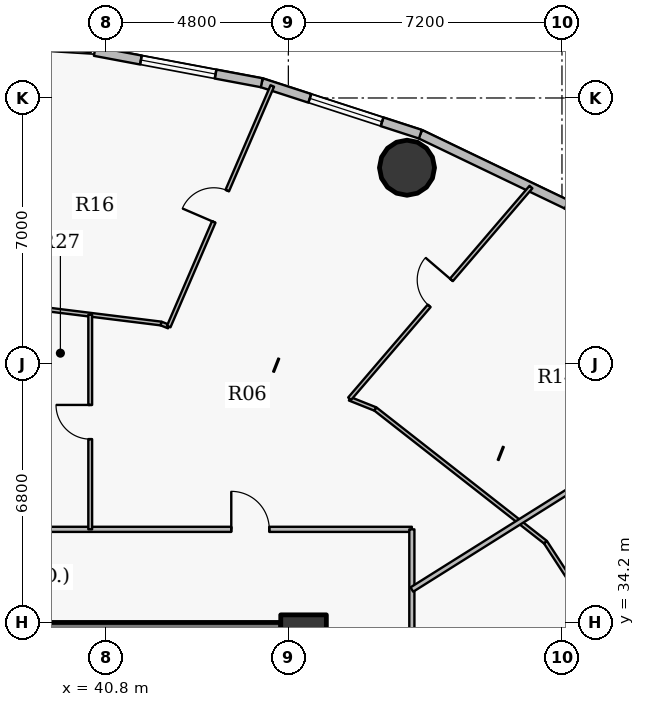
"""IFC4 building model, lengths in metres.
Left out: names, types, materials, properties, quantities, classifications, styles, units other than length and angle.
Written with IfcOpenShell. Run it as: python <this file> out.ifc"""

import sys

from ifc_helpers import new_model, si_unit, direction, frame, frame_2d, origin, origin_2d, place, context, subcontext, project, spatial, rectangle, hollow_circle, extrude, source, transform, mapped, element, fill, save


model = new_model("IFC4")
c1 = context("Model", 3, precision=1e-05, world=origin(), true_north=direction((0.0, 1.0)))
c2 = subcontext(c1, "Body", "Model", "MODEL_VIEW")
j1 = project(units=[si_unit("LENGTHUNIT", "METRE"), si_unit("PLANEANGLEUNIT", "RADIAN")], contexts=[c1])
p1 = place(None, origin())
s1 = spatial("IfcSite", under=j1, at=p1, CompositionType="ELEMENT")
p2 = place(p1, origin())
s2 = spatial("IfcBuilding", under=s1, at=p2, CompositionType="ELEMENT")
p3 = place(p2, frame((0.0, 0.0, 115.95)))
s3 = spatial("IfcBuildingStorey", under=s2, at=p3, CompositionType="ELEMENT", Elevation=115.95)
p4 = place(p3, frame((46.0, 33.8, 0.0), z_axis=(0.0, 0.0, 1.0), x_axis=(1.0, 0.0, 0.0)))
e1 = element("IfcColumn", 1, at=p4, inside=s3, PredefinedType="COLUMN", context=c2, shape_type="SweptSolid", body=[
    extrude(rectangle(XDim=1.2, YDim=1.2, at=origin_2d()), origin(), (0.0, 0.0, 1.0), 3.75),
])
p5 = place(p3, frame((26.6, 33.8, 0.0), z_axis=(0.0, 0.0, 1.0), x_axis=(1.0, 0.0, 0.0)))
e2 = element("IfcWall", 2, at=p5, inside=s3, PredefinedType="SHEAR", context=c2, shape_type="SweptSolid", body=[
    extrude(rectangle(XDim=18.8, YDim=0.8, at=frame_2d((9.4, 0.0))), origin(), (0.0, 0.0, 1.0), 2.95),
])
p6 = place(p3, frame((48.722, 46.165, 0.0), z_axis=(0.0, 0.0, 1.0), x_axis=(1.0, 0.0, 0.0)))
e3 = element("IfcColumn", 3, at=p6, inside=s3, PredefinedType="COLUMN", context=c2, shape_type="SweptSolid", body=[
    extrude(hollow_circle(Radius=0.725, WallThickness=0.042, at=origin_2d()), origin(), (0.0, 0.0, 1.0), 3.75),
])
p7 = place(p3, frame((52.925, 45.199, 0.0), z_axis=(0.0, 0.0, 1.0), x_axis=(0.831221811447, -0.555940914284, 0.0)))
e4 = element("IfcWall", 4, at=p7, inside=s3, PredefinedType="SOLIDWALL", context=c2, shape_type="SweptSolid", body=[
    extrude(rectangle(XDim=4.13, YDim=0.24, at=frame_2d((2.065, 0.0))), origin(), (0.0, 0.0, 1.0), 3.5),
])
p8 = place(p7, frame((1.065, 0.0, 0.9)))
e5 = element("IfcOpeningElement", 5, at=p8, cuts=e4, PredefinedType="OPENING", context=c2, shape_type="SweptSolid", body=[
    extrude(rectangle(XDim=2.0, YDim=1.75, at=origin_2d()), frame((1.0, 0.13, 0.875), z_axis=(0.0, -1.0, 0.0), x_axis=(1.0, 0.0, 0.0)), (0.0, 0.0, 1.0), 0.26),
])
p9 = place(p3, frame((49.074, 47.047, 0.0), z_axis=(0.0, 0.0, 1.0), x_axis=(0.901589935876, -0.432591709962, 0.0)))
e6 = element("IfcWall", 6, at=p9, inside=s3, PredefinedType="SOLIDWALL", context=c2, shape_type="SweptSolid", body=[
    extrude(rectangle(XDim=4.272, YDim=0.24, at=frame_2d((2.136, 0.0))), origin(), (0.0, 0.0, 1.0), 3.5),
])
p10 = place(p3, frame((44.9, 48.401, 0.0), z_axis=(0.0, 0.0, 1.0), x_axis=(0.951211346073, -0.308540070495, 0.0)))
e7 = element("IfcWall", 7, at=p10, inside=s3, PredefinedType="SOLIDWALL", context=c2, shape_type="SweptSolid", body=[
    extrude(rectangle(XDim=4.388, YDim=0.24, at=frame_2d((2.194, 0.0))), origin(), (0.0, 0.0, 1.0), 3.5),
])
p11 = place(p10, frame((1.329, 0.0, 0.9)))
e8 = element("IfcOpeningElement", 8, at=p11, cuts=e7, PredefinedType="OPENING", context=c2, shape_type="SweptSolid", body=[
    extrude(rectangle(XDim=2.0, YDim=1.75, at=origin_2d()), frame((1.0, 0.13, 0.875), z_axis=(0.0, -1.0, 0.0), x_axis=(1.0, 0.0, 0.0)), (0.0, 0.0, 1.0), 0.26),
])
p12 = place(p3, frame((40.506, 49.227, 0.0), z_axis=(0.0, 0.0, 1.0), x_axis=(0.982789252177, -0.184730305596, 0.0)))
e9 = element("IfcWall", 9, at=p12, inside=s3, PredefinedType="SOLIDWALL", context=c2, shape_type="SweptSolid", body=[
    extrude(rectangle(XDim=4.471, YDim=0.24, at=frame_2d((2.235, 0.0))), origin(), (0.0, 0.0, 1.0), 3.5),
])
p13 = place(p12, frame((1.236, 0.0, 0.9)))
e10 = element("IfcOpeningElement", 10, at=p13, cuts=e9, PredefinedType="OPENING", context=c2, shape_type="SweptSolid", body=[
    extrude(rectangle(XDim=2.0, YDim=1.75, at=origin_2d()), frame((1.0, 0.13, 0.875), z_axis=(0.0, -1.0, 0.0), x_axis=(1.0, 0.0, 0.0)), (0.0, 0.0, 1.0), 0.26),
])
p14 = place(p3, frame((36.0, 42.841, 0.0), z_axis=(0.0, 0.0, 1.0), x_axis=(0.992395485088, -0.123090215599, 0.0)))
e11 = element("IfcWall", 11, at=p14, inside=s3, PredefinedType="PARTITIONING", context=c2, shape_type="SweptSolid", body=[
    extrude(rectangle(XDim=6.299, YDim=0.1, at=frame_2d((3.15, 0.0))), origin(), (0.0, 0.0, 1.0), 2.935),
])
p15 = place(p3, frame((38.477, 36.65, 0.0), z_axis=(0.0, 0.0, 1.0), x_axis=(1.0, 0.0, 0.0)))
e12 = element("IfcWall", 12, at=p15, inside=s3, PredefinedType="PARTITIONING", context=c2, shape_type="SweptSolid", body=[
    extrude(rectangle(XDim=10.373, YDim=0.135, at=frame_2d((5.187, 0.0))), origin(), (0.0, 0.0, 1.0), 2.935),
])
p16 = place(p15, frame((5.621, 0.0, 0.0)))
e13 = element("IfcOpeningElement", 13, at=p16, cuts=e12, PredefinedType="OPENING", context=c2, shape_type="SweptSolid", body=[
    extrude(rectangle(XDim=1.0, YDim=2.15, at=origin_2d()), frame((0.5, 0.078, 1.075), z_axis=(0.0, -1.0, 0.0), x_axis=(1.0, 0.0, 0.0)), (0.0, 0.0, 1.0), 0.155),
])
p17 = place(p3, frame((40.386, 36.65, 0.0), z_axis=(0.0, 0.0, 1.0), x_axis=(0.0, 1.0, 0.0)))
e14 = element("IfcWall", 14, at=p17, inside=s3, PredefinedType="PARTITIONING", context=c2, shape_type="SweptSolid", body=[
    extrude(rectangle(XDim=5.647, YDim=0.1, at=frame_2d((2.824, 0.0))), origin(), (0.0, 0.0, 1.0), 3.5),
])
p18 = place(p17, frame((2.374, 0.0, 0.0)))
e15 = element("IfcOpeningElement", 15, at=p18, cuts=e14, PredefinedType="OPENING", context=c2, shape_type="SweptSolid", body=[
    extrude(rectangle(XDim=0.9, YDim=2.1, at=origin_2d()), frame((0.45, 0.06, 1.05), z_axis=(0.0, -1.0, 0.0), x_axis=(1.0, 0.0, 0.0)), (0.0, 0.0, 1.0), 0.12),
])
p19 = place(p3, frame((42.251, 42.066, 0.0), z_axis=(0.0, 0.0, 1.0), x_axis=(0.928632622675, -0.371000609303, 0.0)))
e16 = element("IfcWall", 16, at=p19, inside=s3, PredefinedType="PARTITIONING", context=c2, shape_type="SweptSolid", body=[
    extrude(rectangle(XDim=0.216, YDim=0.1, at=frame_2d((0.108, 0.0))), origin(), (0.0, 0.0, 1.0), 3.5),
])
p20 = place(p3, frame((42.452, 41.986, 0.0), z_axis=(0.0, 0.0, 1.0), x_axis=(0.395466235438, 0.918480515105, 0.0)))
e17 = element("IfcWall", 17, at=p20, inside=s3, PredefinedType="PARTITIONING", context=c2, shape_type="SweptSolid", body=[
    extrude(rectangle(XDim=6.893, YDim=0.1, at=frame_2d((3.446, 0.0))), origin(), (0.0, 0.0, 1.0), 2.935),
])
p21 = place(p20, frame((2.996, 0.0, 0.0)))
e18 = element("IfcOpeningElement", 18, at=p21, cuts=e17, PredefinedType="OPENING", context=c2, shape_type="SweptSolid", body=[
    extrude(rectangle(XDim=0.9, YDim=2.1, at=origin_2d()), frame((0.45, 0.06, 1.05), z_axis=(0.0, -1.0, 0.0), x_axis=(1.0, 0.0, 0.0)), (0.0, 0.0, 1.0), 0.12),
])
p22 = place(p3, frame((47.212, 40.087, 0.0), z_axis=(0.0, 0.0, 1.0), x_axis=(0.928752817467, -0.370699614307, 0.0)))
e19 = element("IfcWall", 19, at=p22, inside=s3, PredefinedType="PARTITIONING", context=c2, shape_type="SweptSolid", body=[
    extrude(rectangle(XDim=0.731, YDim=0.1, at=frame_2d((0.365, 0.0))), origin(), (0.0, 0.0, 1.0), 3.185),
])
p23 = place(p3, frame((47.212, 40.087, 0.0), z_axis=(0.0, 0.0, 1.0), x_axis=(0.650621399292, 0.759402261508, 0.0)))
e20 = element("IfcWall", 20, at=p23, inside=s3, PredefinedType="PARTITIONING", context=c2, shape_type="SweptSolid", body=[
    extrude(rectangle(XDim=7.334, YDim=0.1, at=frame_2d((3.667, 0.0))), origin(), (0.0, 0.0, 1.0), 2.935),
])
p24 = place(p23, frame((3.217, 0.0, 0.0)))
e21 = element("IfcOpeningElement", 21, at=p24, cuts=e20, PredefinedType="OPENING", context=c2, shape_type="SweptSolid", body=[
    extrude(rectangle(XDim=0.9, YDim=2.1, at=origin_2d()), frame((0.45, 0.06, 1.05), z_axis=(0.0, -1.0, 0.0), x_axis=(1.0, 0.0, 0.0)), (0.0, 0.0, 1.0), 0.12),
])
p25 = place(p3, frame((47.891, 39.816, 0.0), z_axis=(0.0, 0.0, 1.0), x_axis=(0.787338202739, -0.616521333376, 0.0)))
e22 = element("IfcWall", 22, at=p25, inside=s3, PredefinedType="PARTITIONING", context=c2, shape_type="SweptSolid", body=[
    extrude(rectangle(XDim=5.684, YDim=0.1, at=frame_2d((2.842, 0.0))), origin(), (0.0, 0.0, 1.0), 2.935),
])
p26 = place(p3, frame((48.85, 17.35, 0.0), z_axis=(0.0, 0.0, 1.0), x_axis=(0.0, 1.0, 0.0)))
e23 = element("IfcWall", 23, at=p26, inside=s3, PredefinedType="PARTITIONING", context=c2, shape_type="SweptSolid", body=[
    extrude(rectangle(XDim=19.3, YDim=0.135, at=frame_2d((9.65, 0.0))), origin(), (0.0, 0.0, 1.0), 2.935),
])
p27 = place(p26, frame((2.036, 0.0, 0.0)))
e24 = element("IfcOpeningElement", 24, at=p27, cuts=e23, PredefinedType="OPENING", context=c2, shape_type="SweptSolid", body=[
    extrude(rectangle(XDim=1.0, YDim=2.15, at=origin_2d()), frame((0.5, 0.078, 1.075), z_axis=(0.0, -1.0, 0.0), x_axis=(1.0, 0.0, 0.0)), (0.0, 0.0, 1.0), 0.155),
])
p28 = place(p26, frame((10.875, 0.0, 0.0)))
e25 = element("IfcOpeningElement", 25, at=p28, cuts=e23, PredefinedType="OPENING", context=c2, shape_type="SweptSolid", body=[
    extrude(rectangle(XDim=1.0, YDim=2.15, at=origin_2d()), frame((0.5, 0.078, 1.075), z_axis=(0.0, -1.0, 0.0), x_axis=(1.0, 0.0, 0.0)), (0.0, 0.0, 1.0), 0.155),
])
p29 = place(p3, frame((48.85, 35.066, 0.0), z_axis=(0.0, 0.0, 1.0), x_axis=(0.846963568038, 0.531650932866, 0.0)))
e26 = element("IfcWall", 26, at=p29, inside=s3, PredefinedType="PARTITIONING", context=c2, shape_type="SweptSolid", body=[
    extrude(rectangle(XDim=11.258, YDim=0.135, at=frame_2d((5.629, 0.0))), origin(), (0.0, 0.0, 1.0), 2.935),
])
p30 = place(p3, frame((52.366, 36.311, 0.0), z_axis=(0.0, 0.0, 1.0), x_axis=(0.545394651961, -0.838179380331, 0.0)))
e27 = element("IfcWall", 27, at=p30, inside=s3, PredefinedType="PARTITIONING", context=c2, shape_type="SweptSolid", body=[
    extrude(rectangle(XDim=5.068, YDim=0.1, at=frame_2d((2.534, 0.0))), origin(), (0.0, 0.0, 1.0), 3.5),
])
p31 = place(p3, frame((46.4, 34.2, 0.0), z_axis=(0.0, 0.0, 1.0), x_axis=(-1.0, 0.0, 0.0)))
e28 = element("IfcWall", 28, at=p31, inside=s3, PredefinedType="PARTITIONING", context=c2, shape_type="SweptSolid", body=[
    extrude(rectangle(XDim=0.99, YDim=0.135, at=frame_2d((0.495, 0.0))), origin(), (0.0, 0.0, 1.0), 2.935),
])
m1 = source(origin(), c2, "Body", "SweptSolid", [
    extrude(rectangle(XDim=2.0, YDim=1.75, at=origin_2d()), frame((1.0, 0.03, 0.875), z_axis=(0.0, -1.0, 0.0), x_axis=(1.0, 0.0, 0.0)), (0.0, 0.0, 1.0), 0.06),
])
p32 = place(p11, origin())
e29 = element("IfcWindow", 29, at=p32, inside=s3, PartitioningType="DOUBLE_PANEL_VERTICAL", PredefinedType="WINDOW", context=c2, shape_type="MappedRepresentation", body=[
    mapped(m1, transform((0.0, 0.0, 0.0), x_axis=(1.0, 0.0, 0.0), y_axis=(0.0, 1.0, 0.0), z_axis=(0.0, 0.0, 1.0), scale=1.0)),
])
fill(e8, e29)
p33 = place(p13, origin())
e30 = element("IfcWindow", 30, at=p33, inside=s3, PartitioningType="DOUBLE_PANEL_VERTICAL", PredefinedType="WINDOW", context=c2, shape_type="MappedRepresentation", body=[
    mapped(m1, transform((0.0, 0.0, 0.0), x_axis=(1.0, 0.0, 0.0), y_axis=(0.0, 1.0, 0.0), z_axis=(0.0, 0.0, 1.0), scale=1.0)),
])
fill(e10, e30)
m2 = source(origin(), c2, "Body", "SweptSolid", [
    extrude(rectangle(XDim=1.0, YDim=2.15, at=origin_2d()), frame((0.5, 0.025, 1.075), z_axis=(0.0, -1.0, 0.0), x_axis=(1.0, 0.0, 0.0)), (0.0, 0.0, 1.0), 0.05),
])
p34 = place(p16, origin())
e31 = element("IfcDoor", 31, at=p34, inside=s3, OperationType="SINGLE_SWING_LEFT", PredefinedType="DOOR", context=c2, shape_type="MappedRepresentation", body=[
    mapped(m2, transform((0.0, 0.0, 0.0), x_axis=(1.0, 0.0, 0.0), y_axis=(0.0, 1.0, 0.0), z_axis=(0.0, 0.0, 1.0), scale=1.0)),
])
fill(e13, e31)
m3 = source(origin(), c2, "Body", "SweptSolid", [
    extrude(rectangle(XDim=0.9, YDim=2.1, at=origin_2d()), frame((0.45, 0.025, 1.05), z_axis=(0.0, -1.0, 0.0), x_axis=(1.0, 0.0, 0.0)), (0.0, 0.0, 1.0), 0.05),
])
p35 = place(p24, origin())
e32 = element("IfcDoor", 32, at=p35, inside=s3, OperationType="SINGLE_SWING_RIGHT", PredefinedType="DOOR", context=c2, shape_type="MappedRepresentation", body=[
    mapped(m3, transform((0.0, 0.0, 0.0), x_axis=(1.0, 0.0, 0.0), y_axis=(0.0, 1.0, 0.0), z_axis=(0.0, 0.0, 1.0), scale=1.0)),
])
fill(e21, e32)
p36 = place(p21, origin())
e33 = element("IfcDoor", 33, at=p36, inside=s3, OperationType="SINGLE_SWING_LEFT", PredefinedType="DOOR", context=c2, shape_type="MappedRepresentation", body=[
    mapped(m3, transform((0.0, 0.0, 0.0), x_axis=(1.0, 0.0, 0.0), y_axis=(0.0, 1.0, 0.0), z_axis=(0.0, 0.0, 1.0), scale=1.0)),
])
fill(e18, e33)
p37 = place(p18, origin())
e34 = element("IfcDoor", 34, at=p37, inside=s3, OperationType="SINGLE_SWING_RIGHT", PredefinedType="DOOR", context=c2, shape_type="MappedRepresentation", body=[
    mapped(m3, transform((0.0, 0.0, 0.0), x_axis=(1.0, 0.0, 0.0), y_axis=(0.0, 1.0, 0.0), z_axis=(0.0, 0.0, 1.0), scale=1.0)),
])
fill(e15, e34)
save(model, sys.argv[1])
